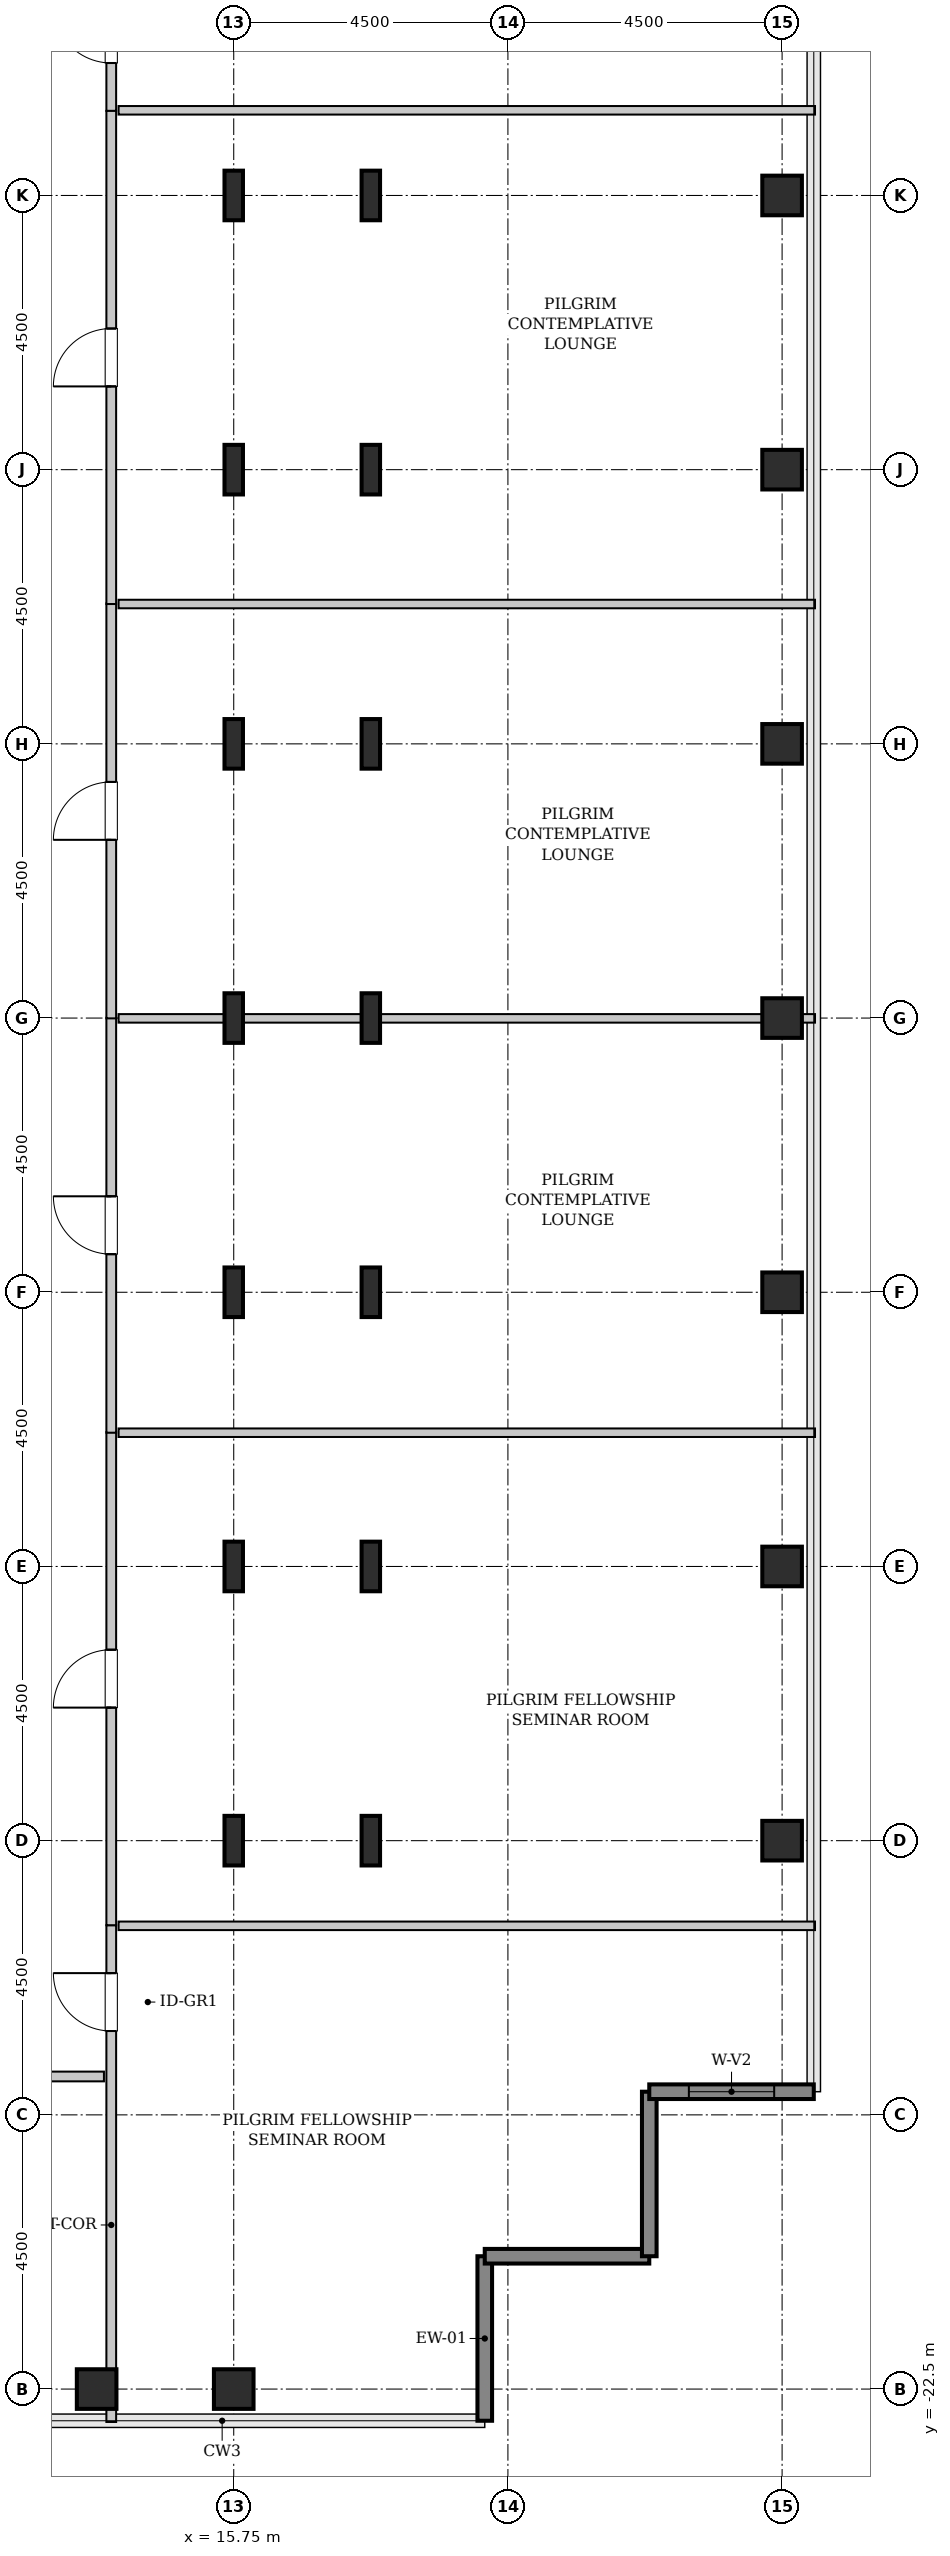
"""IFC4 building model, lengths in metres.
Left out: names, types, materials, properties, quantities, classifications, styles, units other than length and angle.
Written with IfcOpenShell. Run it as: python <this file> out.ifc"""

import sys

from ifc_helpers import new_model, si_unit, direction, frame, frame_2d, origin, origin_2d, place, context, subcontext, project, spatial, rectangle, hollow_rectangle, i_section, extrude, source, transform, mapped, element, fill, save


model = new_model("IFC4")
c1 = context("Model", 3, precision=1e-05, world=origin(), true_north=direction((0.0, 1.0)))
c2 = subcontext(c1, "Body", "Model", "MODEL_VIEW")
j1 = project(units=[si_unit("LENGTHUNIT", "METRE"), si_unit("PLANEANGLEUNIT", "RADIAN")], contexts=[c1])
p1 = place(None, origin())
s1 = spatial("IfcSite", under=j1, at=p1, CompositionType="ELEMENT")
p2 = place(p1, origin())
s2 = spatial("IfcBuilding", under=s1, at=p2, CompositionType="ELEMENT")
p3 = place(p2, frame((0.0, 0.0, 214.2)))
s3 = spatial("IfcBuildingStorey", under=s2, at=p3, CompositionType="ELEMENT", Elevation=214.2)
m1 = source(origin(), c2, "Body", "SweptSolid", [
    extrude(hollow_rectangle(XDim=0.65, YDim=0.65, WallThickness=0.032, InnerFilletRadius=0.032, OuterFilletRadius=0.064, at=origin_2d()), origin(), (0.0, 0.0, 1.0), 3.8),
])
for number, where, z_axis, x_axis in (
    (1, (13.5, -22.5, 0.0), (0.0, 0.0, 1.0), (1.0, 0.0, 0.0)),
    (2, (15.75, -22.5, 0.0), (0.0, 0.0, 1.0), (1.0, 0.0, 0.0)),
):
    element("IfcColumn", number, at=place(p3, frame(where, z_axis=z_axis, x_axis=x_axis)), inside=s3, PredefinedType="COLUMN", context=c2, shape_type="MappedRepresentation", body=[
        mapped(m1, transform((0.0, 0.0, 0.0), x_axis=(1.0, 0.0, 0.0), y_axis=(0.0, 1.0, 0.0), z_axis=(0.0, 0.0, 1.0), scale=1.0)),
    ])
m2 = source(origin(), c2, "Body", "SweptSolid", [
    extrude(i_section(OverallWidth=0.303, OverallDepth=0.814, WebThickness=0.021, FlangeThickness=0.04, FilletRadius=0.03, at=origin_2d()), origin(), (0.0, 0.0, 1.0), 3.8),
])
for number, where, z_axis, x_axis in (
    (3, (15.75, -13.5, 0.0), (0.0, 0.0, 1.0), (1.0, 0.0, 0.0)),
    (4, (15.75, -9.0, 0.0), (0.0, 0.0, 1.0), (1.0, 0.0, 0.0)),
    (5, (15.75, -4.5, 0.0), (0.0, 0.0, 1.0), (1.0, 0.0, 0.0)),
    (6, (15.75, 0.0, 0.0), (0.0, 0.0, 1.0), (1.0, 0.0, 0.0)),
    (7, (15.75, 4.5, 0.0), (0.0, 0.0, 1.0), (1.0, 0.0, 0.0)),
    (8, (15.75, 9.0, 0.0), (0.0, 0.0, 1.0), (1.0, 0.0, 0.0)),
    (9, (15.75, 13.5, 0.0), (0.0, 0.0, 1.0), (1.0, 0.0, 0.0)),
    (10, (18.0, -13.5, 0.0), (0.0, 0.0, 1.0), (1.0, 0.0, 0.0)),
    (11, (18.0, -9.0, 0.0), (0.0, 0.0, 1.0), (1.0, 0.0, 0.0)),
    (12, (18.0, -4.5, 0.0), (0.0, 0.0, 1.0), (1.0, 0.0, 0.0)),
    (13, (18.0, 0.0, 0.0), (0.0, 0.0, 1.0), (1.0, 0.0, 0.0)),
    (14, (18.0, 4.5, 0.0), (0.0, 0.0, 1.0), (1.0, 0.0, 0.0)),
    (15, (18.0, 9.0, 0.0), (0.0, 0.0, 1.0), (1.0, 0.0, 0.0)),
    (16, (18.0, 13.5, 0.0), (0.0, 0.0, 1.0), (1.0, 0.0, 0.0)),
):
    element("IfcColumn", number, at=place(p3, frame(where, z_axis=z_axis, x_axis=x_axis)), inside=s3, PredefinedType="COLUMN", context=c2, shape_type="MappedRepresentation", body=[
        mapped(m2, transform((0.0, 0.0, 0.0), x_axis=(1.0, 0.0, 0.0), y_axis=(0.0, 1.0, 0.0), z_axis=(0.0, 0.0, 1.0), scale=1.0)),
    ])
for number, where, z_axis, x_axis in (
    (17, (24.75, -13.5, 0.0), (0.0, 0.0, 1.0), (1.0, 0.0, 0.0)),
    (18, (24.75, -9.0, 0.0), (0.0, 0.0, 1.0), (1.0, 0.0, 0.0)),
    (19, (24.75, -4.5, 0.0), (0.0, 0.0, 1.0), (1.0, 0.0, 0.0)),
    (20, (24.75, 0.0, 0.0), (0.0, 0.0, 1.0), (1.0, 0.0, 0.0)),
    (21, (24.75, 4.5, 0.0), (0.0, 0.0, 1.0), (1.0, 0.0, 0.0)),
    (22, (24.75, 9.0, 0.0), (0.0, 0.0, 1.0), (1.0, 0.0, 0.0)),
    (23, (24.75, 13.5, 0.0), (0.0, 0.0, 1.0), (1.0, 0.0, 0.0)),
):
    element("IfcColumn", number, at=place(p3, frame(where, z_axis=z_axis, x_axis=x_axis)), inside=s3, PredefinedType="COLUMN", context=c2, shape_type="MappedRepresentation", body=[
        mapped(m1, transform((0.0, 0.0, 0.0), x_axis=(1.0, 0.0, 0.0), y_axis=(0.0, 1.0, 0.0), z_axis=(0.0, 0.0, 1.0), scale=1.0)),
    ])
m3 = source(origin(), c2, "Body", "SweptSolid", [
    extrude(rectangle(XDim=2.7, YDim=0.24, at=frame_2d((1.35, 0.0))), origin(), (0.0, 0.0, 1.0), 3.55),
])
for number, where, z_axis, x_axis in (
    (24, (19.87, -23.02, 0.0), (0.0, 0.0, 1.0), (0.0, 1.0, 0.0)),
    (25, (19.87, -20.32, 0.0), (0.0, 0.0, 1.0), (1.0, 0.0, 0.0)),
    (26, (22.57, -20.32, 0.0), (0.0, 0.0, 1.0), (0.0, 1.0, 0.0)),
):
    element("IfcWall", number, at=place(p3, frame(where, z_axis=z_axis, x_axis=x_axis)), inside=s3, PredefinedType="SHEAR", context=c2, shape_type="MappedRepresentation", body=[
        mapped(m3, transform((0.0, 0.0, 0.0), x_axis=(1.0, 0.0, 0.0), y_axis=(0.0, 1.0, 0.0), z_axis=(0.0, 0.0, 1.0), scale=1.0)),
    ])
p4 = place(p3, frame((22.57, -17.62, 0.0), z_axis=(0.0, 0.0, 1.0), x_axis=(1.0, 0.0, 0.0)))
e27 = element("IfcWall", 27, at=p4, inside=s3, PredefinedType="SHEAR", context=c2, shape_type="MappedRepresentation", body=[
    mapped(m3, transform((0.0, 0.0, 0.0), x_axis=(1.0, 0.0, 0.0), y_axis=(0.0, 1.0, 0.0), z_axis=(0.0, 0.0, 1.0), scale=1.0)),
])
p5 = place(p4, frame((0.65, 0.0, 0.85)))
e28 = element("IfcOpeningElement", 28, at=p5, cuts=e27, PredefinedType="OPENING", context=c2, shape_type="SweptSolid", body=[
    extrude(rectangle(XDim=1.4, YDim=1.8, at=frame_2d((0.7, 0.9))), frame((0.0, 0.13, 0.0), z_axis=(0.0, -1.0, 0.0), x_axis=(1.0, 0.0, 0.0)), (0.0, 0.0, 1.0), 0.26),
])
m4 = source(origin(), c2, "Body", "SweptSolid", [
    extrude(rectangle(XDim=8.153, YDim=0.16, at=frame_2d((4.076, 0.0))), origin(), (0.0, 0.0, 1.0), 3.535),
])
p6 = place(p3, frame((13.74, -23.04, 0.0), z_axis=(0.0, 0.0, 1.0), x_axis=(0.0, 1.0, 0.0)))
e29 = element("IfcWall", 29, at=p6, inside=s3, PredefinedType="PARTITIONING", context=c2, shape_type="MappedRepresentation", body=[
    mapped(m4, transform((0.0, 0.0, 0.0), x_axis=(1.0, 0.0, 0.0), y_axis=(0.0, 1.0, 0.0), z_axis=(0.0, 0.0, 1.0), scale=1.0)),
])
p7 = place(p6, frame((6.416, 0.0, 0.0)))
e30 = element("IfcOpeningElement", 30, at=p7, cuts=e29, PredefinedType="OPENING", context=c2, shape_type="SweptSolid", body=[
    extrude(rectangle(XDim=0.95, YDim=2.1, at=frame_2d((0.475, 1.05))), frame((0.0, 0.09, 0.0), z_axis=(0.0, -1.0, 0.0), x_axis=(1.0, 0.0, 0.0)), (0.0, 0.0, 1.0), 0.18),
])
m5 = source(origin(), c2, "Body", "SweptSolid", [
    extrude(rectangle(XDim=11.43, YDim=0.14, at=frame_2d((5.715, 0.0))), origin(), (0.0, 0.0, 1.0), 3.535),
])
p8 = place(p3, frame((13.86, -14.897, 0.0), z_axis=(0.0, 0.0, 1.0), x_axis=(1.0, 0.0, 0.0)))
e31 = element("IfcWall", 31, at=p8, inside=s3, PredefinedType="PARTITIONING", context=c2, shape_type="MappedRepresentation", body=[
    mapped(m5, transform((0.0, 0.0, 0.0), x_axis=(1.0, 0.0, 0.0), y_axis=(0.0, 1.0, 0.0), z_axis=(0.0, 0.0, 1.0), scale=1.0)),
])
m6 = source(origin(), c2, "Body", "SweptSolid", [
    extrude(rectangle(XDim=8.093, YDim=0.16, at=frame_2d((4.046, 0.0))), origin(), (0.0, 0.0, 1.0), 3.535),
])
p9 = place(p3, frame((13.74, -14.887, 0.0), z_axis=(0.0, 0.0, 1.0), x_axis=(0.0, 1.0, 0.0)))
e32 = element("IfcWall", 32, at=p9, inside=s3, PredefinedType="PARTITIONING", context=c2, shape_type="MappedRepresentation", body=[
    mapped(m6, transform((0.0, 0.0, 0.0), x_axis=(1.0, 0.0, 0.0), y_axis=(0.0, 1.0, 0.0), z_axis=(0.0, 0.0, 1.0), scale=1.0)),
])
p10 = place(p9, frame((3.571, 0.0, 0.0)))
e33 = element("IfcOpeningElement", 33, at=p10, cuts=e32, PredefinedType="OPENING", context=c2, shape_type="SweptSolid", body=[
    extrude(rectangle(XDim=0.95, YDim=2.1, at=frame_2d((0.475, 1.05))), frame((0.0, 0.09, 0.0), z_axis=(0.0, -1.0, 0.0), x_axis=(1.0, 0.0, 0.0)), (0.0, 0.0, 1.0), 0.18),
])
p11 = place(p3, frame((13.86, -6.805, 0.0), z_axis=(0.0, 0.0, 1.0), x_axis=(1.0, 0.0, 0.0)))
e34 = element("IfcWall", 34, at=p11, inside=s3, PredefinedType="PARTITIONING", context=c2, shape_type="MappedRepresentation", body=[
    mapped(m5, transform((0.0, 0.0, 0.0), x_axis=(1.0, 0.0, 0.0), y_axis=(0.0, 1.0, 0.0), z_axis=(0.0, 0.0, 1.0), scale=1.0)),
])
m7 = source(origin(), c2, "Body", "SweptSolid", [
    extrude(rectangle(XDim=6.81, YDim=0.16, at=frame_2d((3.405, 0.0))), origin(), (0.0, 0.0, 1.0), 3.535),
])
p12 = place(p3, frame((13.74, -6.805, 0.0), z_axis=(0.0, 0.0, 1.0), x_axis=(0.0, 1.0, 0.0)))
e35 = element("IfcWall", 35, at=p12, inside=s3, PredefinedType="PARTITIONING", context=c2, shape_type="MappedRepresentation", body=[
    mapped(m7, transform((0.0, 0.0, 0.0), x_axis=(1.0, 0.0, 0.0), y_axis=(0.0, 1.0, 0.0), z_axis=(0.0, 0.0, 1.0), scale=1.0)),
])
p13 = place(p12, frame((2.93, 0.0, 0.0)))
e36 = element("IfcOpeningElement", 36, at=p13, cuts=e35, PredefinedType="OPENING", context=c2, shape_type="SweptSolid", body=[
    extrude(rectangle(XDim=0.95, YDim=2.1, at=frame_2d((0.475, 1.05))), frame((0.0, 0.09, 0.0), z_axis=(0.0, -1.0, 0.0), x_axis=(1.0, 0.0, 0.0)), (0.0, 0.0, 1.0), 0.18),
])
m8 = source(origin(), c2, "Body", "SweptSolid", [
    extrude(rectangle(XDim=11.43, YDim=0.14, at=frame_2d((5.715, 0.0))), origin(), (0.0, 0.0, 1.0), 2.925),
])
p14 = place(p3, frame((13.86, -0.005, 0.0), z_axis=(0.0, 0.0, 1.0), x_axis=(1.0, 0.0, 0.0)))
e37 = element("IfcWall", 37, at=p14, inside=s3, PredefinedType="PARTITIONING", context=c2, shape_type="MappedRepresentation", body=[
    mapped(m8, transform((0.0, 0.0, 0.0), x_axis=(1.0, 0.0, 0.0), y_axis=(0.0, 1.0, 0.0), z_axis=(0.0, 0.0, 1.0), scale=1.0)),
])
p15 = place(p3, frame((13.74, -0.005, 0.0), z_axis=(0.0, 0.0, 1.0), x_axis=(0.0, 1.0, 0.0)))
e38 = element("IfcWall", 38, at=p15, inside=s3, PredefinedType="PARTITIONING", context=c2, shape_type="MappedRepresentation", body=[
    mapped(m7, transform((0.0, 0.0, 0.0), x_axis=(1.0, 0.0, 0.0), y_axis=(0.0, 1.0, 0.0), z_axis=(0.0, 0.0, 1.0), scale=1.0)),
])
p16 = place(p15, frame((2.93, 0.0, 0.0)))
e39 = element("IfcOpeningElement", 39, at=p16, cuts=e38, PredefinedType="OPENING", context=c2, shape_type="SweptSolid", body=[
    extrude(rectangle(XDim=0.95, YDim=2.1, at=frame_2d((0.475, 1.05))), frame((0.0, 0.09, 0.0), z_axis=(0.0, -1.0, 0.0), x_axis=(1.0, 0.0, 0.0)), (0.0, 0.0, 1.0), 0.18),
])
p17 = place(p3, frame((13.86, 6.795, 0.0), z_axis=(0.0, 0.0, 1.0), x_axis=(1.0, 0.0, 0.0)))
e40 = element("IfcWall", 40, at=p17, inside=s3, PredefinedType="PARTITIONING", context=c2, shape_type="MappedRepresentation", body=[
    mapped(m5, transform((0.0, 0.0, 0.0), x_axis=(1.0, 0.0, 0.0), y_axis=(0.0, 1.0, 0.0), z_axis=(0.0, 0.0, 1.0), scale=1.0)),
])
p18 = place(p3, frame((13.74, 14.887, 0.0), z_axis=(0.0, 0.0, 1.0), x_axis=(0.0, 1.0, 0.0)))
e41 = element("IfcWall", 41, at=p18, inside=s3, PredefinedType="PARTITIONING", context=c2, shape_type="MappedRepresentation", body=[
    mapped(m4, transform((0.0, 0.0, 0.0), x_axis=(1.0, 0.0, 0.0), y_axis=(0.0, 1.0, 0.0), z_axis=(0.0, 0.0, 1.0), scale=1.0)),
])
p19 = place(p18, frame((0.786, 0.0, 0.0)))
e42 = element("IfcOpeningElement", 42, at=p19, cuts=e41, PredefinedType="OPENING", context=c2, shape_type="SweptSolid", body=[
    extrude(rectangle(XDim=0.95, YDim=2.1, at=frame_2d((0.475, 1.05))), frame((0.0, 0.09, 0.0), z_axis=(0.0, -1.0, 0.0), x_axis=(1.0, 0.0, 0.0)), (0.0, 0.0, 1.0), 0.18),
])
p20 = place(p3, frame((13.86, 14.897, 0.0), z_axis=(0.0, 0.0, 1.0), x_axis=(1.0, 0.0, 0.0)))
e43 = element("IfcWall", 43, at=p20, inside=s3, PredefinedType="PARTITIONING", context=c2, shape_type="MappedRepresentation", body=[
    mapped(m5, transform((0.0, 0.0, 0.0), x_axis=(1.0, 0.0, 0.0), y_axis=(0.0, 1.0, 0.0), z_axis=(0.0, 0.0, 1.0), scale=1.0)),
])
p21 = place(p3, frame((13.74, 6.795, 0.0), z_axis=(0.0, 0.0, 1.0), x_axis=(0.0, 1.0, 0.0)))
e44 = element("IfcWall", 44, at=p21, inside=s3, PredefinedType="PARTITIONING", context=c2, shape_type="MappedRepresentation", body=[
    mapped(m6, transform((0.0, 0.0, 0.0), x_axis=(1.0, 0.0, 0.0), y_axis=(0.0, 1.0, 0.0), z_axis=(0.0, 0.0, 1.0), scale=1.0)),
])
p22 = place(p21, frame((3.571, 0.0, 0.0)))
e45 = element("IfcOpeningElement", 45, at=p22, cuts=e44, PredefinedType="OPENING", context=c2, shape_type="SweptSolid", body=[
    extrude(rectangle(XDim=0.95, YDim=2.1, at=frame_2d((0.475, 1.05))), frame((0.0, 0.09, 0.0), z_axis=(0.0, -1.0, 0.0), x_axis=(1.0, 0.0, 0.0)), (0.0, 0.0, 1.0), 0.18),
])
m9 = source(origin(), c2, "Body", "SweptSolid", [
    extrude(rectangle(XDim=6.225, YDim=0.16, at=frame_2d((3.113, 0.0))), origin(), (0.0, 0.0, 1.0), 3.535),
])
p23 = place(p3, frame((7.395, -17.37, 0.0), z_axis=(0.0, 0.0, 1.0), x_axis=(1.0, 0.0, 0.0)))
e46 = element("IfcWall", 46, at=p23, inside=s3, PredefinedType="PARTITIONING", context=c2, shape_type="MappedRepresentation", body=[
    mapped(m9, transform((0.0, 0.0, 0.0), x_axis=(1.0, 0.0, 0.0), y_axis=(0.0, 1.0, 0.0), z_axis=(0.0, 0.0, 1.0), scale=1.0)),
])
p24 = place(p23, frame((2.26, 0.0, 0.0)))
e47 = element("IfcOpeningElement", 47, at=p24, cuts=e46, PredefinedType="OPENING", context=c2, shape_type="SweptSolid", body=[
    extrude(rectangle(XDim=0.95, YDim=2.1, at=frame_2d((0.475, 1.05))), frame((0.0, 0.09, 0.0), z_axis=(0.0, -1.0, 0.0), x_axis=(1.0, 0.0, 0.0)), (0.0, 0.0, 1.0), 0.18),
])
m10 = source(origin(), c2, "Body", "SweptSolid", [
    extrude(rectangle(XDim=1.4, YDim=1.8, at=frame_2d((0.7, 0.9))), frame((0.0, 0.03, 0.0), z_axis=(0.0, -1.0, 0.0), x_axis=(1.0, 0.0, 0.0)), (0.0, 0.0, 1.0), 0.06),
])
p25 = place(p5, origin())
e48 = element("IfcWindow", 48, at=p25, inside=s3, PartitioningType="SINGLE_PANEL", PredefinedType="WINDOW", context=c2, shape_type="MappedRepresentation", body=[
    mapped(m10, transform((0.0, 0.0, 0.0), x_axis=(1.0, 0.0, 0.0), y_axis=(0.0, 1.0, 0.0), z_axis=(0.0, 0.0, 1.0), scale=1.0)),
])
fill(e28, e48)
m11 = source(origin(), c2, "Body", "SweptSolid", [
    extrude(rectangle(XDim=0.95, YDim=2.1, at=frame_2d((0.475, 1.05))), frame((0.0, 0.025, 0.0), z_axis=(0.0, -1.0, 0.0), x_axis=(1.0, 0.0, 0.0)), (0.0, 0.0, 1.0), 0.05),
])
p26 = place(p7, origin())
e49 = element("IfcDoor", 49, at=p26, inside=s3, OperationType="SINGLE_SWING_RIGHT", PredefinedType="DOOR", context=c2, shape_type="MappedRepresentation", body=[
    mapped(m11, transform((0.0, 0.0, 0.0), x_axis=(1.0, 0.0, 0.0), y_axis=(0.0, 1.0, 0.0), z_axis=(0.0, 0.0, 1.0), scale=1.0)),
])
fill(e30, e49)
p27 = place(p10, origin())
e50 = element("IfcDoor", 50, at=p27, inside=s3, OperationType="SINGLE_SWING_LEFT", PredefinedType="DOOR", context=c2, shape_type="MappedRepresentation", body=[
    mapped(m11, transform((0.0, 0.0, 0.0), x_axis=(1.0, 0.0, 0.0), y_axis=(0.0, 1.0, 0.0), z_axis=(0.0, 0.0, 1.0), scale=1.0)),
])
fill(e33, e50)
p28 = place(p13, origin())
e51 = element("IfcDoor", 51, at=p28, inside=s3, OperationType="SINGLE_SWING_RIGHT", PredefinedType="DOOR", context=c2, shape_type="MappedRepresentation", body=[
    mapped(m11, transform((0.0, 0.0, 0.0), x_axis=(1.0, 0.0, 0.0), y_axis=(0.0, 1.0, 0.0), z_axis=(0.0, 0.0, 1.0), scale=1.0)),
])
fill(e36, e51)
p29 = place(p16, origin())
e52 = element("IfcDoor", 52, at=p29, inside=s3, OperationType="SINGLE_SWING_LEFT", PredefinedType="DOOR", context=c2, shape_type="MappedRepresentation", body=[
    mapped(m11, transform((0.0, 0.0, 0.0), x_axis=(1.0, 0.0, 0.0), y_axis=(0.0, 1.0, 0.0), z_axis=(0.0, 0.0, 1.0), scale=1.0)),
])
fill(e39, e52)
p30 = place(p19, origin())
e53 = element("IfcDoor", 53, at=p30, inside=s3, OperationType="SINGLE_SWING_RIGHT", PredefinedType="DOOR", context=c2, shape_type="MappedRepresentation", body=[
    mapped(m11, transform((0.0, 0.0, 0.0), x_axis=(1.0, 0.0, 0.0), y_axis=(0.0, 1.0, 0.0), z_axis=(0.0, 0.0, 1.0), scale=1.0)),
])
fill(e42, e53)
p31 = place(p22, origin())
e54 = element("IfcDoor", 54, at=p31, inside=s3, OperationType="SINGLE_SWING_LEFT", PredefinedType="DOOR", context=c2, shape_type="MappedRepresentation", body=[
    mapped(m11, transform((0.0, 0.0, 0.0), x_axis=(1.0, 0.0, 0.0), y_axis=(0.0, 1.0, 0.0), z_axis=(0.0, 0.0, 1.0), scale=1.0)),
])
fill(e45, e54)
save(model, sys.argv[1])
